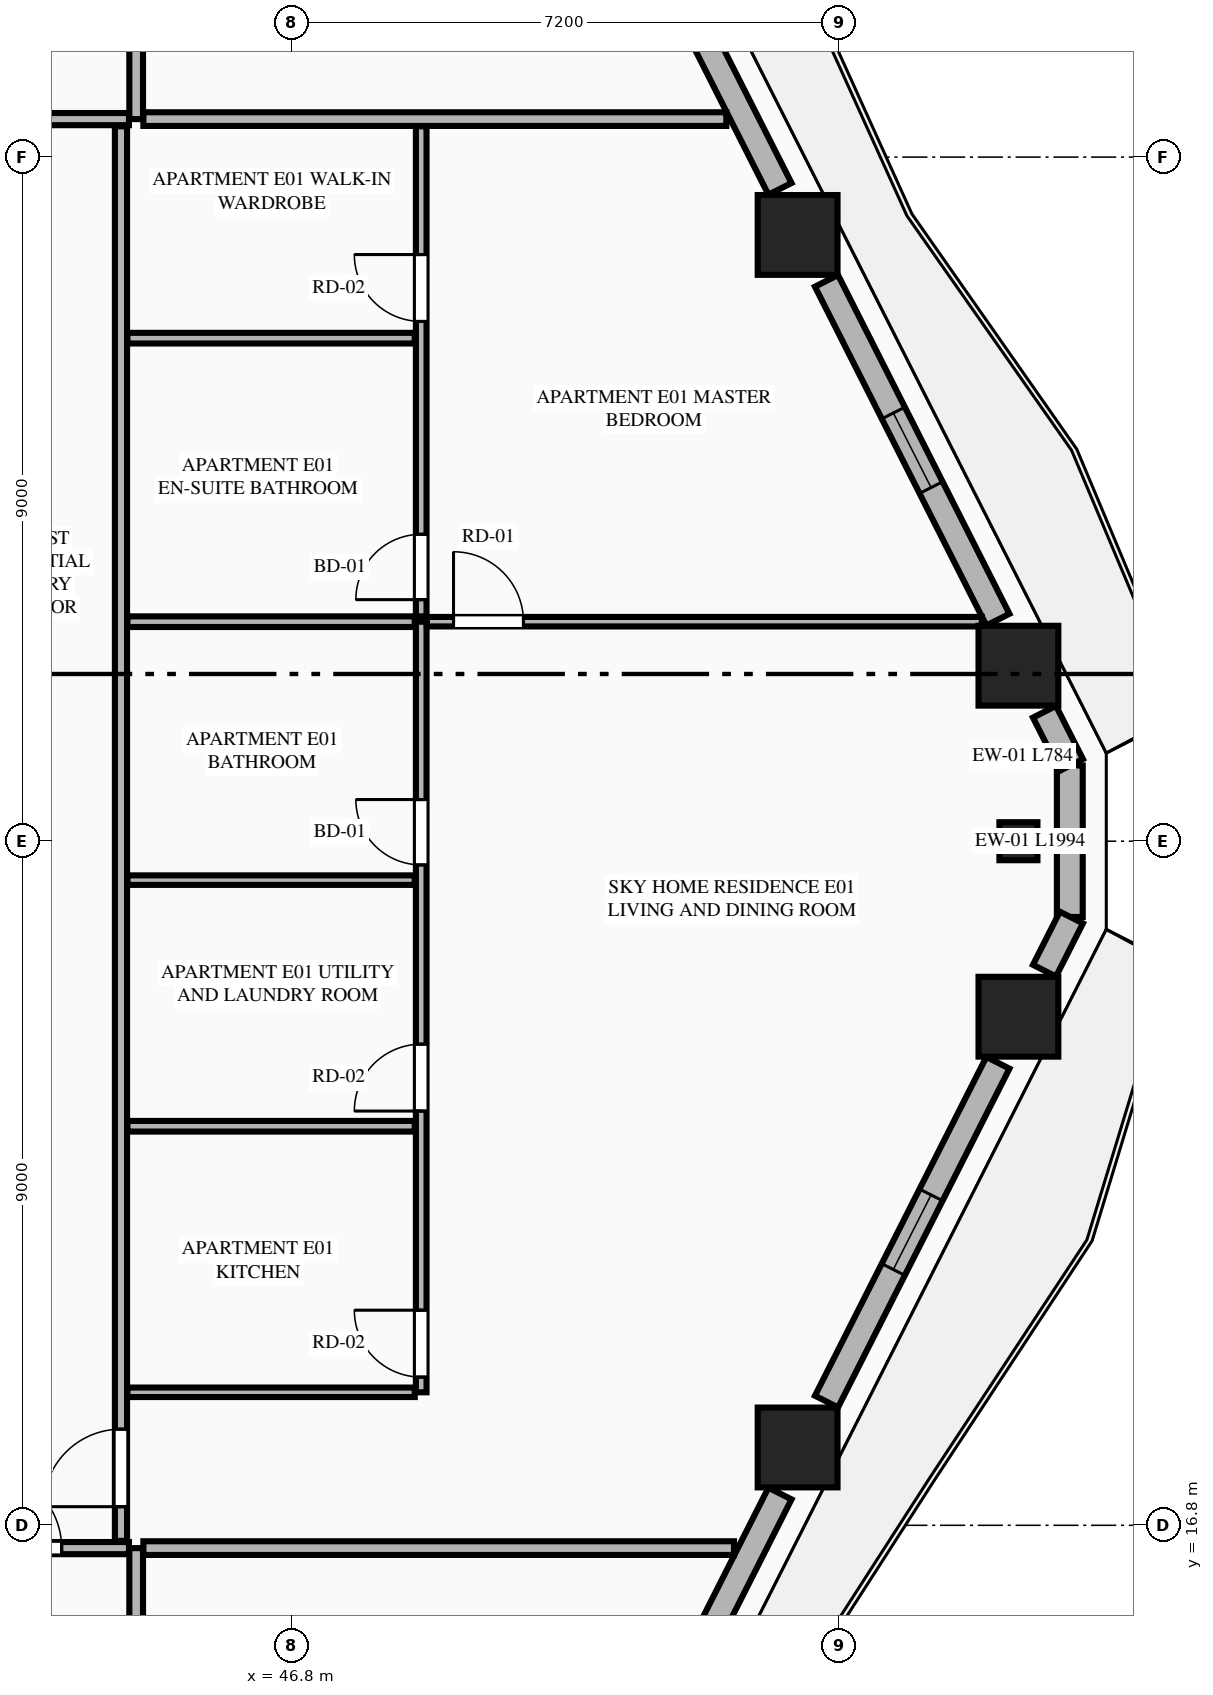
"""IFC4 building model, lengths in metres.
Left out: names, types, materials, properties, quantities, classifications, styles, units other than length and angle.
Written with IfcOpenShell. Run it as: python <this file> out.ifc"""

import sys

from ifc_helpers import new_model, si_unit, direction, frame, frame_2d, origin, origin_2d, place, context, subcontext, project, spatial, rectangle, extrude, element, fill, save


model = new_model("IFC4")
c1 = context("Model", 3, precision=1e-05, world=origin(), true_north=direction((0.0, 1.0)))
c2 = subcontext(c1, "Body", "Model", "MODEL_VIEW")
j1 = project(units=[si_unit("LENGTHUNIT", "METRE"), si_unit("PLANEANGLEUNIT", "RADIAN")], contexts=[c1])
p1 = place(None, origin())
s1 = spatial("IfcSite", under=j1, at=p1, CompositionType="ELEMENT")
p2 = place(p1, origin())
s2 = spatial("IfcBuilding", under=s1, at=p2, CompositionType="ELEMENT")
p3 = place(p2, frame((0.0, 0.0, 126.8)))
s3 = spatial("IfcBuildingStorey", under=s2, at=p3, CompositionType="ELEMENT", Elevation=126.8)
for number, where, z_axis, x_axis in (
    (1, (53.452, 17.824, 0.0), (0.0, 0.0, 1.0), (1.0, 0.0, 0.0)),
    (2, (56.357, 23.491, 0.0), (0.0, 0.0, 1.0), (1.0, 0.0, 0.0)),
    (3, (56.357, 28.109, 0.0), (0.0, 0.0, 1.0), (1.0, 0.0, 0.0)),
    (4, (53.452, 33.776, 0.0), (0.0, 0.0, 1.0), (1.0, 0.0, 0.0)),
):
    element("IfcColumn", number, at=place(p3, frame(where, z_axis=z_axis, x_axis=x_axis)), inside=s3, PredefinedType="COLUMN", context=c2, shape_type="SweptSolid", body=[
        extrude(rectangle(XDim=1.05, YDim=1.05, at=origin_2d()), origin(), (0.0, 0.0, 1.0), 3.55),
    ])
p4 = place(p3, frame((56.357, 25.8, 0.0), z_axis=(0.0, 0.0, 1.0), x_axis=(0.0, 1.0, 0.0)))
e5 = element("IfcColumn", 5, at=p4, inside=s3, PredefinedType="PILASTER", context=c2, shape_type="SweptSolid", body=[
    extrude(rectangle(XDim=0.5, YDim=0.35, at=origin_2d()), origin(), (0.0, 0.0, 1.0), 3.55),
])
p5 = place(p3, frame((57.033, 24.803, 0.0), z_axis=(0.0, 0.0, 1.0), x_axis=(0.0, 1.0, 0.0)))
e6 = element("IfcWall", 6, at=p5, inside=s3, PredefinedType="STANDARD", context=c2, shape_type="SweptSolid", body=[
    extrude(rectangle(XDim=1.994, YDim=0.34, at=frame_2d((0.997, 0.0))), origin(), (0.0, 0.0, 1.0), 3.34),
])
p6 = place(p3, frame((50.863, 12.561, 0.0), z_axis=(0.0, 0.0, 1.0), x_axis=(0.451567731634, 0.892236842855, 0.0)))
e7 = element("IfcWall", 7, at=p6, inside=s3, PredefinedType="STANDARD", context=c2, shape_type="SweptSolid", body=[
    extrude(rectangle(XDim=5.219, YDim=0.34, at=frame_2d((2.61, 0.0))), origin(), (0.0, 0.0, 1.0), 2.797),
])
p7 = place(p6, frame((1.532, 0.0, 0.0)))
e8 = element("IfcOpeningElement", 8, at=p7, cuts=e7, PredefinedType="OPENING", context=c2, shape_type="SweptSolid", body=[
    extrude(rectangle(XDim=1.1, YDim=2.25, at=frame_2d((0.55, 1.125))), frame((0.0, 0.18, 0.0), z_axis=(0.0, -1.0, 0.0), x_axis=(1.0, 0.0, 0.0)), (0.0, 0.0, 1.0), 0.36),
])
p8 = place(p3, frame((53.832, 18.428, 0.0), z_axis=(0.0, 0.0, 1.0), x_axis=(0.451431617681, 0.892305718102, 0.0)))
e9 = element("IfcWall", 9, at=p8, inside=s3, PredefinedType="STANDARD", context=c2, shape_type="SweptSolid", body=[
    extrude(rectangle(XDim=4.995, YDim=0.34, at=frame_2d((2.498, 0.0))), origin(), (0.0, 0.0, 1.0), 2.797),
])
p9 = place(p8, frame((1.947, 0.0, 0.75)))
e10 = element("IfcOpeningElement", 10, at=p9, cuts=e9, PredefinedType="OPENING", context=c2, shape_type="SweptSolid", body=[
    extrude(rectangle(XDim=1.1, YDim=1.897, at=frame_2d((0.55, 0.948))), frame((0.0, 0.18, 0.0), z_axis=(0.0, -1.0, 0.0), x_axis=(1.0, 0.0, 0.0)), (0.0, 0.0, 1.0), 0.36),
])
for number, where, z_axis, x_axis in (
    (11, (56.7, 24.097, 0.0), (0.0, 0.0, 1.0), (0.452, 0.892, 0.0)),
    (12, (57.054, 26.804, 0.0), (0.0, 0.0, 1.0), (-0.452, 0.892, 0.0)),
):
    element("IfcWall", number, at=place(p3, frame(where, z_axis=z_axis, x_axis=x_axis)), inside=s3, PredefinedType="STANDARD", context=c2, shape_type="SweptSolid", body=[
        extrude(rectangle(XDim=0.783, YDim=0.34, at=frame_2d((0.392, 0.0))), origin(), (0.0, 0.0, 1.0), 3.34),
    ])
p10 = place(p3, frame((56.087, 28.715, 0.0), z_axis=(0.0, 0.0, 1.0), x_axis=(-0.451431617681, 0.892305718102, 0.0)))
e13 = element("IfcWall", 13, at=p10, inside=s3, PredefinedType="STANDARD", context=c2, shape_type="SweptSolid", body=[
    extrude(rectangle(XDim=4.995, YDim=0.34, at=frame_2d((2.498, 0.0))), origin(), (0.0, 0.0, 1.0), 2.797),
])
p11 = place(p10, frame((1.947, 0.0, 0.75)))
e14 = element("IfcOpeningElement", 14, at=p11, cuts=e13, PredefinedType="OPENING", context=c2, shape_type="SweptSolid", body=[
    extrude(rectangle(XDim=1.1, YDim=1.897, at=frame_2d((0.55, 0.948))), frame((0.0, 0.18, 0.0), z_axis=(0.0, -1.0, 0.0), x_axis=(1.0, 0.0, 0.0)), (0.0, 0.0, 1.0), 0.36),
])
p12 = place(p3, frame((53.22, 34.382, 0.0), z_axis=(0.0, 0.0, 1.0), x_axis=(-0.451567731634, 0.892236842855, 0.0)))
e15 = element("IfcWall", 15, at=p12, inside=s3, PredefinedType="STANDARD", context=c2, shape_type="SweptSolid", body=[
    extrude(rectangle(XDim=5.219, YDim=0.34, at=frame_2d((2.61, 0.0))), origin(), (0.0, 0.0, 1.0), 2.797),
])
p13 = place(p12, frame((2.699, 0.0, 0.0)))
e16 = element("IfcOpeningElement", 16, at=p13, cuts=e15, PredefinedType="OPENING", context=c2, shape_type="SweptSolid", body=[
    extrude(rectangle(XDim=1.1, YDim=2.25, at=frame_2d((0.55, 1.125))), frame((0.0, 0.18, 0.0), z_axis=(0.0, -1.0, 0.0), x_axis=(1.0, 0.0, 0.0)), (0.0, 0.0, 1.0), 0.36),
])
p14 = place(p3, frame((44.75, 4.105, 0.0), z_axis=(0.0, 0.0, 1.0), x_axis=(0.0, 1.0, 0.0)))
e17 = element("IfcWall", 17, at=p14, inside=s3, PredefinedType="PARTITIONING", context=c2, shape_type="SweptSolid", body=[
    extrude(rectangle(XDim=12.395, YDim=0.18, at=frame_2d((6.198, 0.0))), origin(), (0.0, 0.0, 1.0), 3.34),
])
p15 = place(p3, frame((28.663, 16.5, 0.0), z_axis=(0.0, 0.0, 1.0), x_axis=(1.0, 0.0, 0.0)))
e18 = element("IfcWall", 18, at=p15, inside=s3, PredefinedType="PARTITIONING", context=c2, shape_type="SweptSolid", body=[
    extrude(rectangle(XDim=15.992, YDim=0.16, at=frame_2d((7.996, 0.0))), origin(), (0.0, 0.0, 1.0), 3.34),
])
p16 = place(p15, frame((14.087, 0.0, 0.0)))
e19 = element("IfcOpeningElement", 19, at=p16, cuts=e18, PredefinedType="OPENING", context=c2, shape_type="SweptSolid", body=[
    extrude(rectangle(XDim=1.02, YDim=2.25, at=frame_2d((0.51, 1.125))), frame((0.0, 0.09, 0.0), z_axis=(0.0, -1.0, 0.0), x_axis=(1.0, 0.0, 0.0)), (0.0, 0.0, 1.0), 0.18),
])
p17 = place(p3, frame((44.75, 35.3, 0.0), z_axis=(0.0, 0.0, 1.0), x_axis=(0.0, 1.0, 0.0)))
e20 = element("IfcWall", 20, at=p17, inside=s3, PredefinedType="PARTITIONING", context=c2, shape_type="SweptSolid", body=[
    extrude(rectangle(XDim=12.195, YDim=0.18, at=frame_2d((6.098, 0.0))), origin(), (0.0, 0.0, 1.0), 3.34),
])
p18 = place(p3, frame((20.145, 35.3, 0.0), z_axis=(0.0, 0.0, 1.0), x_axis=(1.0, 0.0, 0.0)))
e21 = element("IfcWall", 21, at=p18, inside=s3, PredefinedType="PARTITIONING", context=c2, shape_type="SweptSolid", body=[
    extrude(rectangle(XDim=24.51, YDim=0.16, at=frame_2d((12.255, 0.0))), origin(), (0.0, 0.0, 1.0), 3.34),
])
p19 = place(p18, frame((0.405, 0.0, 0.0)))
e22 = element("IfcOpeningElement", 22, at=p19, cuts=e21, PredefinedType="OPENING", context=c2, shape_type="SweptSolid", body=[
    extrude(rectangle(XDim=1.35, YDim=2.35, at=frame_2d((0.675, 1.175))), frame((0.0, 0.09, 0.0), z_axis=(0.0, -1.0, 0.0), x_axis=(1.0, 0.0, 0.0)), (0.0, 0.0, 1.0), 0.18),
])
p20 = place(p3, frame((44.845, 16.5, 0.0), z_axis=(0.0, 0.0, 1.0), x_axis=(1.0, 0.0, 0.0)))
e23 = element("IfcWall", 23, at=p20, inside=s3, PredefinedType="PARTITIONING", context=c2, shape_type="SweptSolid", body=[
    extrude(rectangle(XDim=7.77, YDim=0.18, at=frame_2d((3.885, 0.0))), origin(), (0.0, 0.0, 1.0), 3.34),
])
p21 = place(p3, frame((44.845, 35.3, 0.0), z_axis=(0.0, 0.0, 1.0), x_axis=(1.0, 0.0, 0.0)))
e24 = element("IfcWall", 24, at=p21, inside=s3, PredefinedType="PARTITIONING", context=c2, shape_type="SweptSolid", body=[
    extrude(rectangle(XDim=7.669, YDim=0.18, at=frame_2d((3.834, 0.0))), origin(), (0.0, 0.0, 1.0), 3.34),
])
p22 = place(p3, frame((44.55, 16.595, 0.0), z_axis=(0.0, 0.0, 1.0), x_axis=(0.0, 1.0, 0.0)))
e25 = element("IfcWall", 25, at=p22, inside=s3, PredefinedType="PARTITIONING", context=c2, shape_type="SweptSolid", body=[
    extrude(rectangle(XDim=18.61, YDim=0.16, at=frame_2d((9.305, 0.0))), origin(), (0.0, 0.0, 1.0), 3.34),
])
p23 = place(p22, frame((0.45, 0.0, 0.0)))
e26 = element("IfcOpeningElement", 26, at=p23, cuts=e25, PredefinedType="OPENING", context=c2, shape_type="SweptSolid", body=[
    extrude(rectangle(XDim=1.02, YDim=2.25, at=frame_2d((0.51, 1.125))), frame((0.0, 0.09, 0.0), z_axis=(0.0, -1.0, 0.0), x_axis=(1.0, 0.0, 0.0)), (0.0, 0.0, 1.0), 0.18),
])
p24 = place(p3, frame((44.635, 18.55, 0.0), z_axis=(0.0, 0.0, 1.0), x_axis=(1.0, 0.0, 0.0)))
e27 = element("IfcWall", 27, at=p24, inside=s3, PredefinedType="PARTITIONING", context=c2, shape_type="SweptSolid", body=[
    extrude(rectangle(XDim=3.78, YDim=0.125, at=frame_2d((1.89, 0.0))), origin(), (0.0, 0.0, 1.0), 2.722),
])
p25 = place(p3, frame((48.5, 18.55, 0.0), z_axis=(0.0, 0.0, 1.0), x_axis=(0.0, 1.0, 0.0)))
e28 = element("IfcWall", 28, at=p25, inside=s3, PredefinedType="PLUMBINGWALL", context=c2, shape_type="SweptSolid", body=[
    extrude(rectangle(XDim=10.138, YDim=0.14, at=frame_2d((5.069, 0.0))), origin(), (0.0, 0.0, 1.0), 3.34),
])
p26 = place(p25, frame((0.2, 0.0, 0.0)))
e29 = element("IfcOpeningElement", 29, at=p26, cuts=e28, PredefinedType="OPENING", context=c2, shape_type="SweptSolid", body=[
    extrude(rectangle(XDim=0.88, YDim=2.15, at=frame_2d((0.44, 1.075))), frame((0.0, 0.08, 0.0), z_axis=(0.0, -1.0, 0.0), x_axis=(1.0, 0.0, 0.0)), (0.0, 0.0, 1.0), 0.16),
])
p27 = place(p25, frame((3.7, 0.0, 0.0)))
e30 = element("IfcOpeningElement", 30, at=p27, cuts=e28, PredefinedType="OPENING", context=c2, shape_type="SweptSolid", body=[
    extrude(rectangle(XDim=0.88, YDim=2.15, at=frame_2d((0.44, 1.075))), frame((0.0, 0.08, 0.0), z_axis=(0.0, -1.0, 0.0), x_axis=(1.0, 0.0, 0.0)), (0.0, 0.0, 1.0), 0.16),
])
p28 = place(p25, frame((6.938, 0.0, 0.0)))
e31 = element("IfcOpeningElement", 31, at=p28, cuts=e28, PredefinedType="OPENING", context=c2, shape_type="SweptSolid", body=[
    extrude(rectangle(XDim=0.86, YDim=2.1, at=frame_2d((0.43, 1.05))), frame((0.0, 0.08, 0.0), z_axis=(0.0, -1.0, 0.0), x_axis=(1.0, 0.0, 0.0)), (0.0, 0.0, 1.0), 0.16),
])
p29 = place(p3, frame((48.5, 28.758, 0.0), z_axis=(0.0, 0.0, 1.0), x_axis=(0.0, 1.0, 0.0)))
e32 = element("IfcWall", 32, at=p29, inside=s3, PredefinedType="PLUMBINGWALL", context=c2, shape_type="SweptSolid", body=[
    extrude(rectangle(XDim=6.447, YDim=0.14, at=frame_2d((3.224, 0.0))), origin(), (0.0, 0.0, 1.0), 3.34),
])
p30 = place(p29, frame((0.22, 0.0, 0.0)))
e33 = element("IfcOpeningElement", 33, at=p30, cuts=e32, PredefinedType="OPENING", context=c2, shape_type="SweptSolid", body=[
    extrude(rectangle(XDim=0.86, YDim=2.1, at=frame_2d((0.43, 1.05))), frame((0.0, 0.08, 0.0), z_axis=(0.0, -1.0, 0.0), x_axis=(1.0, 0.0, 0.0)), (0.0, 0.0, 1.0), 0.16),
])
p31 = place(p29, frame((3.88, 0.0, 0.0)))
e34 = element("IfcOpeningElement", 34, at=p31, cuts=e32, PredefinedType="OPENING", context=c2, shape_type="SweptSolid", body=[
    extrude(rectangle(XDim=0.88, YDim=2.15, at=frame_2d((0.44, 1.075))), frame((0.0, 0.08, 0.0), z_axis=(0.0, -1.0, 0.0), x_axis=(1.0, 0.0, 0.0)), (0.0, 0.0, 1.0), 0.16),
])
p32 = place(p3, frame((44.635, 28.688, 0.0), z_axis=(0.0, 0.0, 1.0), x_axis=(1.0, 0.0, 0.0)))
e35 = element("IfcWall", 35, at=p32, inside=s3, PredefinedType="PLUMBINGWALL", context=c2, shape_type="SweptSolid", body=[
    extrude(rectangle(XDim=3.78, YDim=0.14, at=frame_2d((1.89, 0.0))), origin(), (0.0, 0.0, 1.0), 3.34),
])
p33 = place(p3, frame((48.575, 28.688, 0.0), z_axis=(0.0, 0.0, 1.0), x_axis=(1.0, 0.0, 0.0)))
e36 = element("IfcWall", 36, at=p33, inside=s3, PredefinedType="PARTITIONING", context=c2, shape_type="SweptSolid", body=[
    extrude(rectangle(XDim=7.3, YDim=0.125, at=frame_2d((3.65, 0.0))), origin(), (0.0, 0.0, 1.0), 3.34),
])
p34 = place(p33, frame((0.35, 0.0, 0.0)))
e37 = element("IfcOpeningElement", 37, at=p34, cuts=e36, PredefinedType="OPENING", context=c2, shape_type="SweptSolid", body=[
    extrude(rectangle(XDim=0.92, YDim=2.15, at=frame_2d((0.46, 1.075))), frame((0.0, 0.073, 0.0), z_axis=(0.0, -1.0, 0.0), x_axis=(1.0, 0.0, 0.0)), (0.0, 0.0, 1.0), 0.145),
])
p35 = place(p3, frame((44.635, 22.05, 0.0), z_axis=(0.0, 0.0, 1.0), x_axis=(1.0, 0.0, 0.0)))
e38 = element("IfcWall", 38, at=p35, inside=s3, PredefinedType="PLUMBINGWALL", context=c2, shape_type="SweptSolid", body=[
    extrude(rectangle(XDim=3.78, YDim=0.14, at=frame_2d((1.89, 0.0))), origin(), (0.0, 0.0, 1.0), 3.34),
])
p36 = place(p3, frame((44.635, 25.288, 0.0), z_axis=(0.0, 0.0, 1.0), x_axis=(1.0, 0.0, 0.0)))
e39 = element("IfcWall", 39, at=p36, inside=s3, PredefinedType="PARTITIONING", context=c2, shape_type="SweptSolid", body=[
    extrude(rectangle(XDim=3.78, YDim=0.125, at=frame_2d((1.89, 0.0))), origin(), (0.0, 0.0, 1.0), 3.34),
])
p37 = place(p3, frame((44.635, 32.418, 0.0), z_axis=(0.0, 0.0, 1.0), x_axis=(1.0, 0.0, 0.0)))
e40 = element("IfcWall", 40, at=p37, inside=s3, PredefinedType="PLUMBINGWALL", context=c2, shape_type="SweptSolid", body=[
    extrude(rectangle(XDim=3.78, YDim=0.14, at=frame_2d((1.89, 0.0))), origin(), (0.0, 0.0, 1.0), 3.34),
])
p38 = place(p9, origin())
e41 = element("IfcWindow", 41, at=p38, inside=s3, PartitioningType="SINGLE_PANEL", PredefinedType="WINDOW", context=c2, shape_type="SweptSolid", body=[
    extrude(rectangle(XDim=1.1, YDim=1.897, at=frame_2d((0.55, 0.948))), frame((0.0, 0.03, 0.0), z_axis=(0.0, -1.0, 0.0), x_axis=(1.0, 0.0, 0.0)), (0.0, 0.0, 1.0), 0.06),
])
fill(e10, e41)
p39 = place(p11, origin())
e42 = element("IfcWindow", 42, at=p39, inside=s3, PartitioningType="SINGLE_PANEL", PredefinedType="WINDOW", context=c2, shape_type="SweptSolid", body=[
    extrude(rectangle(XDim=1.1, YDim=1.897, at=frame_2d((0.55, 0.948))), frame((0.0, 0.03, 0.0), z_axis=(0.0, -1.0, 0.0), x_axis=(1.0, 0.0, 0.0)), (0.0, 0.0, 1.0), 0.06),
])
fill(e14, e42)
p40 = place(p16, origin())
e43 = element("IfcDoor", 43, at=p40, inside=s3, OperationType="SINGLE_SWING_LEFT", PredefinedType="DOOR", context=c2, shape_type="SweptSolid", body=[
    extrude(rectangle(XDim=1.02, YDim=2.25, at=frame_2d((0.51, 1.125))), frame((0.0, 0.025, 0.0), z_axis=(0.0, -1.0, 0.0), x_axis=(1.0, 0.0, 0.0)), (0.0, 0.0, 1.0), 0.05),
])
fill(e19, e43)
p41 = place(p26, origin())
e44 = element("IfcDoor", 44, at=p41, inside=s3, OperationType="SINGLE_SWING_RIGHT", PredefinedType="DOOR", context=c2, shape_type="SweptSolid", body=[
    extrude(rectangle(XDim=0.88, YDim=2.15, at=frame_2d((0.44, 1.075))), frame((0.0, 0.025, 0.0), z_axis=(0.0, -1.0, 0.0), x_axis=(1.0, 0.0, 0.0)), (0.0, 0.0, 1.0), 0.05),
])
fill(e29, e44)
p42 = place(p27, origin())
e45 = element("IfcDoor", 45, at=p42, inside=s3, OperationType="SINGLE_SWING_LEFT", PredefinedType="DOOR", context=c2, shape_type="SweptSolid", body=[
    extrude(rectangle(XDim=0.88, YDim=2.15, at=frame_2d((0.44, 1.075))), frame((0.0, 0.025, 0.0), z_axis=(0.0, -1.0, 0.0), x_axis=(1.0, 0.0, 0.0)), (0.0, 0.0, 1.0), 0.05),
])
fill(e30, e45)
p43 = place(p28, origin())
e46 = element("IfcDoor", 46, at=p43, inside=s3, OperationType="SINGLE_SWING_RIGHT", PredefinedType="DOOR", context=c2, shape_type="SweptSolid", body=[
    extrude(rectangle(XDim=0.86, YDim=2.1, at=frame_2d((0.43, 1.05))), frame((0.0, 0.025, 0.0), z_axis=(0.0, -1.0, 0.0), x_axis=(1.0, 0.0, 0.0)), (0.0, 0.0, 1.0), 0.05),
])
fill(e31, e46)
p44 = place(p30, origin())
e47 = element("IfcDoor", 47, at=p44, inside=s3, OperationType="SINGLE_SWING_LEFT", PredefinedType="DOOR", context=c2, shape_type="SweptSolid", body=[
    extrude(rectangle(XDim=0.86, YDim=2.1, at=frame_2d((0.43, 1.05))), frame((0.0, 0.025, 0.0), z_axis=(0.0, -1.0, 0.0), x_axis=(1.0, 0.0, 0.0)), (0.0, 0.0, 1.0), 0.05),
])
fill(e33, e47)
p45 = place(p31, origin())
e48 = element("IfcDoor", 48, at=p45, inside=s3, OperationType="SINGLE_SWING_RIGHT", PredefinedType="DOOR", context=c2, shape_type="SweptSolid", body=[
    extrude(rectangle(XDim=0.88, YDim=2.15, at=frame_2d((0.44, 1.075))), frame((0.0, 0.025, 0.0), z_axis=(0.0, -1.0, 0.0), x_axis=(1.0, 0.0, 0.0)), (0.0, 0.0, 1.0), 0.05),
])
fill(e34, e48)
p46 = place(p23, origin())
e49 = element("IfcDoor", 49, at=p46, inside=s3, OperationType="SINGLE_SWING_LEFT", PredefinedType="DOOR", context=c2, shape_type="SweptSolid", body=[
    extrude(rectangle(XDim=1.02, YDim=2.25, at=frame_2d((0.51, 1.125))), frame((0.0, 0.025, 0.0), z_axis=(0.0, -1.0, 0.0), x_axis=(1.0, 0.0, 0.0)), (0.0, 0.0, 1.0), 0.05),
])
fill(e26, e49)
p47 = place(p34, origin())
e50 = element("IfcDoor", 50, at=p47, inside=s3, OperationType="SINGLE_SWING_LEFT", PredefinedType="DOOR", context=c2, shape_type="SweptSolid", body=[
    extrude(rectangle(XDim=0.92, YDim=2.15, at=frame_2d((0.46, 1.075))), frame((0.0, 0.025, 0.0), z_axis=(0.0, -1.0, 0.0), x_axis=(1.0, 0.0, 0.0)), (0.0, 0.0, 1.0), 0.05),
])
fill(e37, e50)
save(model, sys.argv[1])
